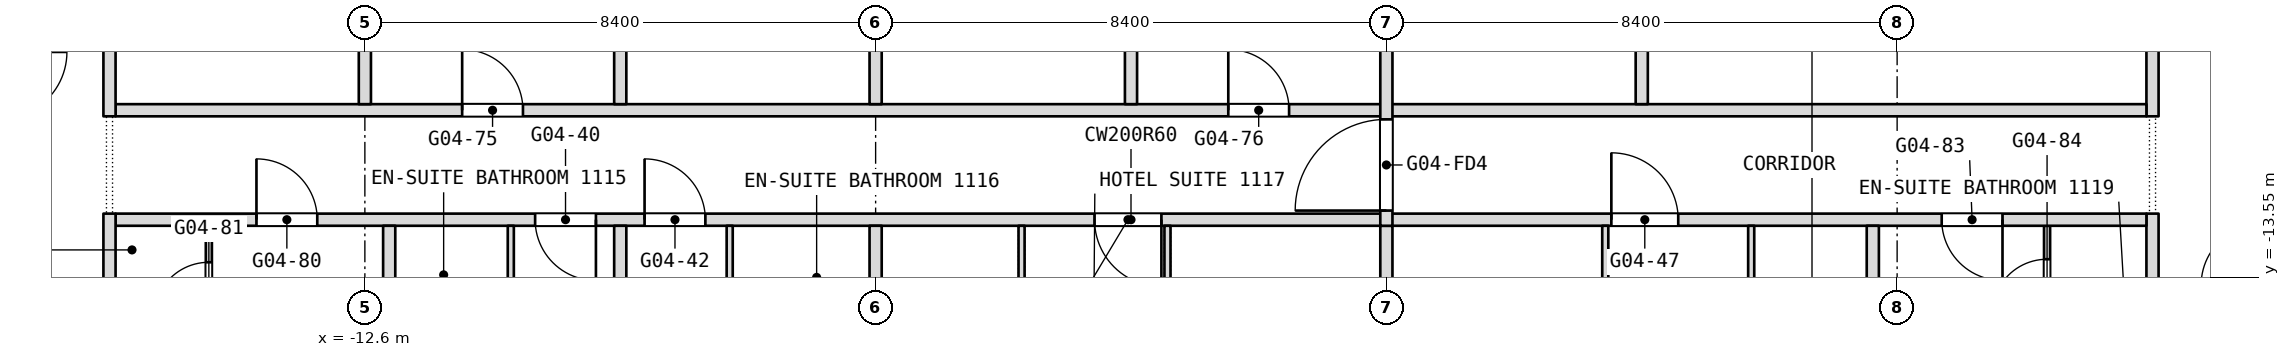
"""IFC4 building model, lengths in metres.
Left out: names, types, materials, properties, quantities, classifications, styles, units other than length and angle.
Written with IfcOpenShell. Run it as: python <this file> out.ifc"""

import sys

from ifc_helpers import new_model, si_unit, direction, frame, frame_2d, origin, place, context, subcontext, project, spatial, rectangle, extrude, element, fill, save


model = new_model("IFC4")
c1 = context("Model", 3, precision=1e-05, world=origin(), true_north=direction((0.0, 1.0)))
c2 = subcontext(c1, "Body", "Model", "MODEL_VIEW")
j1 = project(units=[si_unit("LENGTHUNIT", "METRE"), si_unit("PLANEANGLEUNIT", "RADIAN")], contexts=[c1])
p1 = place(None, origin())
s1 = spatial("IfcSite", under=j1, at=p1, CompositionType="ELEMENT")
p2 = place(p1, origin())
s2 = spatial("IfcBuilding", under=s1, at=p2, CompositionType="ELEMENT")
p3 = place(p2, frame((0.0, 0.0, 54.5)))
s3 = spatial("IfcBuildingStorey", under=s2, at=p3, CompositionType="ELEMENT", Elevation=54.5)
p4 = place(p3, frame((16.8, -17.143, 0.0), z_axis=(0.0, 0.0, 1.0), x_axis=(0.0, 1.0, 0.0)))
e1 = element("IfcWall", 1, at=p4, inside=s3, PredefinedType="PARTITIONING", context=c2, shape_type="SweptSolid", body=[
    extrude(rectangle(XDim=4.643, YDim=0.2, at=frame_2d((2.322, 0.0))), origin(), (0.0, 0.0, 1.0), 3.34),
])
p5 = place(p4, frame((0.771, 0.0, 0.0)))
e2 = element("IfcOpeningElement", 2, at=p5, cuts=e1, PredefinedType="OPENING", context=c2, shape_type="SweptSolid", body=[
    extrude(rectangle(XDim=0.9, YDim=2.1, at=frame_2d((0.45, 1.05))), frame((0.0, 0.1, 0.0), z_axis=(0.0, -1.0, 0.0), x_axis=(1.0, 0.0, 0.0)), (0.0, 0.0, 1.0), 0.2),
])
p6 = place(p3, frame((16.8, -10.9, 0.0), z_axis=(0.0, 0.0, 1.0), x_axis=(0.0, 1.0, 0.0)))
e3 = element("IfcWall", 3, at=p6, inside=s3, PredefinedType="PARTITIONING", context=c2, shape_type="SweptSolid", body=[
    extrude(rectangle(XDim=7.3, YDim=0.2, at=frame_2d((3.65, 0.0))), origin(), (0.0, 0.0, 1.0), 3.34),
])
p7 = place(p6, frame((3.15, 0.0, 0.0)))
e4 = element("IfcOpeningElement", 4, at=p7, cuts=e3, PredefinedType="OPENING", context=c2, shape_type="SweptSolid", body=[
    extrude(rectangle(XDim=1.0, YDim=2.1, at=frame_2d((0.5, 1.05))), frame((0.0, 0.1, 0.0), z_axis=(0.0, -1.0, 0.0), x_axis=(1.0, 0.0, 0.0)), (0.0, 0.0, 1.0), 0.2),
])
p8 = place(p3, frame((15.066, -14.9, 0.0), z_axis=(0.0, 0.0, 1.0), x_axis=(0.0, 1.0, 0.0)))
e5 = element("IfcWall", 5, at=p8, inside=s3, PredefinedType="PARTITIONING", context=c2, shape_type="SweptSolid", body=[
    extrude(rectangle(XDim=2.2, YDim=0.1, at=frame_2d((1.1, 0.0))), origin(), (0.0, 0.0, 1.0), 3.34),
])
p9 = place(p8, frame((0.75, 0.0, 0.0)))
e6 = element("IfcOpeningElement", 6, at=p9, cuts=e5, PredefinedType="OPENING", context=c2, shape_type="SweptSolid", body=[
    extrude(rectangle(XDim=0.9, YDim=2.1, at=frame_2d((0.45, 1.05))), frame((0.0, 0.05, 0.0), z_axis=(0.0, -1.0, 0.0), x_axis=(1.0, 0.0, 0.0)), (0.0, 0.0, 1.0), 0.1),
])
p10 = place(p3, frame((-16.7, -12.6, 0.0), z_axis=(0.0, 0.0, 1.0), x_axis=(1.0, 0.0, 0.0)))
e7 = element("IfcWall", 7, at=p10, inside=s3, PredefinedType="PARTITIONING", context=c2, shape_type="SweptSolid", body=[
    extrude(rectangle(XDim=33.4, YDim=0.2, at=frame_2d((16.7, 0.0))), origin(), (0.0, 0.0, 1.0), 3.34),
])
p11 = place(p10, frame((6.9, 0.0, 0.0)))
e8 = element("IfcOpeningElement", 8, at=p11, cuts=e7, PredefinedType="OPENING", context=c2, shape_type="SweptSolid", body=[
    extrude(rectangle(XDim=1.0, YDim=2.1, at=frame_2d((0.5, 1.05))), frame((0.0, 0.1, 0.0), z_axis=(0.0, -1.0, 0.0), x_axis=(1.0, 0.0, 0.0)), (0.0, 0.0, 1.0), 0.2),
])
p12 = place(p10, frame((8.7, 0.0, 0.0)))
e9 = element("IfcOpeningElement", 9, at=p12, cuts=e7, PredefinedType="OPENING", context=c2, shape_type="SweptSolid", body=[
    extrude(rectangle(XDim=1.0, YDim=2.1, at=frame_2d((0.5, 1.05))), frame((0.0, 0.1, 0.0), z_axis=(0.0, -1.0, 0.0), x_axis=(1.0, 0.0, 0.0)), (0.0, 0.0, 1.0), 0.2),
])
p13 = place(p10, frame((16.1, 0.0, 0.0)))
e10 = element("IfcOpeningElement", 10, at=p13, cuts=e7, PredefinedType="OPENING", context=c2, shape_type="SweptSolid", body=[
    extrude(rectangle(XDim=1.1, YDim=2.1, at=frame_2d((0.55, 1.05))), frame((0.0, 0.1, 0.0), z_axis=(0.0, -1.0, 0.0), x_axis=(1.0, 0.0, 0.0)), (0.0, 0.0, 1.0), 0.2),
])
p14 = place(p10, frame((24.6, 0.0, 0.0)))
e11 = element("IfcOpeningElement", 11, at=p14, cuts=e7, PredefinedType="OPENING", context=c2, shape_type="SweptSolid", body=[
    extrude(rectangle(XDim=1.1, YDim=2.1, at=frame_2d((0.55, 1.05))), frame((0.0, 0.1, 0.0), z_axis=(0.0, -1.0, 0.0), x_axis=(1.0, 0.0, 0.0)), (0.0, 0.0, 1.0), 0.2),
])
p15 = place(p10, frame((2.317, 0.0, 0.0)))
e12 = element("IfcOpeningElement", 12, at=p15, cuts=e7, PredefinedType="OPENING", context=c2, shape_type="SweptSolid", body=[
    extrude(rectangle(XDim=1.0, YDim=2.1, at=frame_2d((0.5, 1.05))), frame((0.0, 0.1, 0.0), z_axis=(0.0, -1.0, 0.0), x_axis=(1.0, 0.0, 0.0)), (0.0, 0.0, 1.0), 0.2),
])
p16 = place(p10, frame((30.033, 0.0, 0.0)))
e13 = element("IfcOpeningElement", 13, at=p16, cuts=e7, PredefinedType="OPENING", context=c2, shape_type="SweptSolid", body=[
    extrude(rectangle(XDim=1.0, YDim=2.1, at=frame_2d((0.5, 1.05))), frame((0.0, 0.1, 0.0), z_axis=(0.0, -1.0, 0.0), x_axis=(1.0, 0.0, 0.0)), (0.0, 0.0, 1.0), 0.2),
])
p17 = place(p3, frame((12.2, -15.8, 0.0), z_axis=(0.0, 0.0, 1.0), x_axis=(0.0, 1.0, 0.0)))
e14 = element("IfcWall", 14, at=p17, inside=s3, PredefinedType="PARTITIONING", context=c2, shape_type="SweptSolid", body=[
    extrude(rectangle(XDim=3.1, YDim=0.2, at=frame_2d((1.55, 0.0))), origin(), (0.0, 0.0, 1.0), 3.34),
])
p18 = place(p3, frame((-16.7, -10.8, 0.0), z_axis=(0.0, 0.0, 1.0), x_axis=(1.0, 0.0, 0.0)))
e15 = element("IfcWall", 15, at=p18, inside=s3, PredefinedType="PARTITIONING", context=c2, shape_type="SweptSolid", body=[
    extrude(rectangle(XDim=33.4, YDim=0.2, at=frame_2d((16.7, 0.0))), origin(), (0.0, 0.0, 1.0), 3.34),
])
p19 = place(p18, frame((5.7, 0.0, 0.0)))
e16 = element("IfcOpeningElement", 16, at=p19, cuts=e15, PredefinedType="OPENING", context=c2, shape_type="SweptSolid", body=[
    extrude(rectangle(XDim=1.0, YDim=2.1, at=frame_2d((0.5, 1.05))), frame((0.0, 0.1, 0.0), z_axis=(0.0, -1.0, 0.0), x_axis=(1.0, 0.0, 0.0)), (0.0, 0.0, 1.0), 0.2),
])
p20 = place(p18, frame((18.3, 0.0, 0.0)))
e17 = element("IfcOpeningElement", 17, at=p20, cuts=e15, PredefinedType="OPENING", context=c2, shape_type="SweptSolid", body=[
    extrude(rectangle(XDim=1.0, YDim=2.1, at=frame_2d((0.5, 1.05))), frame((0.0, 0.1, 0.0), z_axis=(0.0, -1.0, 0.0), x_axis=(1.0, 0.0, 0.0)), (0.0, 0.0, 1.0), 0.2),
])
p21 = place(p3, frame((10.2, -16.25, 0.0), z_axis=(0.0, 0.0, 1.0), x_axis=(0.0, 1.0, 0.0)))
e18 = element("IfcWall", 18, at=p21, inside=s3, PredefinedType="PARTITIONING", context=c2, shape_type="SweptSolid", body=[
    extrude(rectangle(XDim=3.55, YDim=0.1, at=frame_2d((1.775, 0.0))), origin(), (0.0, 0.0, 1.0), 3.34),
])
p22 = place(p3, frame((8.4, -10.7, 0.0), z_axis=(0.0, 0.0, 1.0), x_axis=(0.0, 1.0, 0.0)))
e19 = element("IfcWall", 19, at=p22, inside=s3, PredefinedType="PARTITIONING", context=c2, shape_type="SweptSolid", body=[
    extrude(rectangle(XDim=3.6, YDim=0.2, at=frame_2d((1.8, 0.0))), origin(), (0.0, 0.0, 1.0), 3.34),
])
p23 = place(p3, frame((7.8, -16.15, 0.0), z_axis=(0.0, 0.0, 1.0), x_axis=(0.0, 1.0, 0.0)))
e20 = element("IfcWall", 20, at=p23, inside=s3, PredefinedType="PARTITIONING", context=c2, shape_type="SweptSolid", body=[
    extrude(rectangle(XDim=3.45, YDim=0.1, at=frame_2d((1.725, 0.0))), origin(), (0.0, 0.0, 1.0), 3.34),
])
p24 = place(p3, frame((4.2, -17.7, 0.0), z_axis=(0.0, 0.0, 1.0), x_axis=(0.0, 1.0, 0.0)))
e21 = element("IfcWall", 21, at=p24, inside=s3, PredefinedType="PARTITIONING", context=c2, shape_type="SweptSolid", body=[
    extrude(rectangle(XDim=5.0, YDim=0.2, at=frame_2d((2.5, 0.0))), origin(), (0.0, 0.0, 1.0), 3.34),
])
p25 = place(p3, frame((4.2, -12.7, 0.0), z_axis=(0.0, 0.0, 1.0), x_axis=(0.0, 1.0, 0.0)))
e22 = element("IfcWall", 22, at=p25, inside=s3, PredefinedType="PARTITIONING", context=c2, shape_type="SweptSolid", body=[
    extrude(rectangle(XDim=12.7, YDim=0.2, at=frame_2d((6.35, 0.0))), origin(), (0.0, 0.0, 1.0), 3.34),
])
p26 = place(p25, frame((11.05, 0.0, 0.0)))
e23 = element("IfcOpeningElement", 23, at=p26, cuts=e22, PredefinedType="OPENING", context=c2, shape_type="SweptSolid", body=[
    extrude(rectangle(XDim=1.5, YDim=2.1, at=frame_2d((0.75, 1.05))), frame((0.0, 0.1, 0.0), z_axis=(0.0, -1.0, 0.0), x_axis=(1.0, 0.0, 0.0)), (0.0, 0.0, 1.0), 0.2),
])
p27 = place(p25, frame((0.25, 0.0, 0.0)))
e24 = element("IfcOpeningElement", 24, at=p27, cuts=e22, PredefinedType="OPENING", context=c2, shape_type="SweptSolid", body=[
    extrude(rectangle(XDim=1.5, YDim=2.1, at=frame_2d((0.75, 1.05))), frame((0.0, 0.1, 0.0), z_axis=(0.0, -1.0, 0.0), x_axis=(1.0, 0.0, 0.0)), (0.0, 0.0, 1.0), 0.2),
])
p28 = place(p3, frame((0.6, -16.25, 0.0), z_axis=(0.0, 0.0, 1.0), x_axis=(0.0, 1.0, 0.0)))
e25 = element("IfcWall", 25, at=p28, inside=s3, PredefinedType="PARTITIONING", context=c2, shape_type="SweptSolid", body=[
    extrude(rectangle(XDim=3.55, YDim=0.1, at=frame_2d((1.775, 0.0))), origin(), (0.0, 0.0, 1.0), 3.34),
])
p29 = place(p3, frame((0.0, -10.7, 0.0), z_axis=(0.0, 0.0, 1.0), x_axis=(0.0, 1.0, 0.0)))
e26 = element("IfcWall", 26, at=p29, inside=s3, PredefinedType="PARTITIONING", context=c2, shape_type="SweptSolid", body=[
    extrude(rectangle(XDim=8.8, YDim=0.2, at=frame_2d((4.4, 0.0))), origin(), (0.0, 0.0, 1.0), 3.34),
])
p30 = place(p3, frame((-1.8, -16.15, 0.0), z_axis=(0.0, 0.0, 1.0), x_axis=(0.0, 1.0, 0.0)))
e27 = element("IfcWall", 27, at=p30, inside=s3, PredefinedType="PARTITIONING", context=c2, shape_type="SweptSolid", body=[
    extrude(rectangle(XDim=3.45, YDim=0.1, at=frame_2d((1.725, 0.0))), origin(), (0.0, 0.0, 1.0), 3.34),
])
p31 = place(p3, frame((-4.2, -17.7, 0.0), z_axis=(0.0, 0.0, 1.0), x_axis=(0.0, 1.0, 0.0)))
e28 = element("IfcWall", 28, at=p31, inside=s3, PredefinedType="PARTITIONING", context=c2, shape_type="SweptSolid", body=[
    extrude(rectangle(XDim=5.0, YDim=0.2, at=frame_2d((2.5, 0.0))), origin(), (0.0, 0.0, 1.0), 3.34),
])
p32 = place(p3, frame((-4.2, -10.7, 0.0), z_axis=(0.0, 0.0, 1.0), x_axis=(0.0, 1.0, 0.0)))
e29 = element("IfcWall", 29, at=p32, inside=s3, PredefinedType="PARTITIONING", context=c2, shape_type="SweptSolid", body=[
    extrude(rectangle(XDim=8.8, YDim=0.2, at=frame_2d((4.4, 0.0))), origin(), (0.0, 0.0, 1.0), 3.34),
])
p33 = place(p3, frame((-6.6, -15.425, 0.0), z_axis=(0.0, 0.0, 1.0), x_axis=(0.0, 1.0, 0.0)))
e30 = element("IfcWall", 30, at=p33, inside=s3, PredefinedType="PARTITIONING", context=c2, shape_type="SweptSolid", body=[
    extrude(rectangle(XDim=2.725, YDim=0.1, at=frame_2d((1.363, 0.0))), origin(), (0.0, 0.0, 1.0), 3.34),
])
p34 = place(p3, frame((-8.4, -17.7, 0.0), z_axis=(0.0, 0.0, 1.0), x_axis=(0.0, 1.0, 0.0)))
e31 = element("IfcWall", 31, at=p34, inside=s3, PredefinedType="PARTITIONING", context=c2, shape_type="SweptSolid", body=[
    extrude(rectangle(XDim=5.0, YDim=0.2, at=frame_2d((2.5, 0.0))), origin(), (0.0, 0.0, 1.0), 3.34),
])
p35 = place(p3, frame((-8.4, -10.7, 0.0), z_axis=(0.0, 0.0, 1.0), x_axis=(0.0, 1.0, 0.0)))
e32 = element("IfcWall", 32, at=p35, inside=s3, PredefinedType="PARTITIONING", context=c2, shape_type="SweptSolid", body=[
    extrude(rectangle(XDim=5.4, YDim=0.2, at=frame_2d((2.7, 0.0))), origin(), (0.0, 0.0, 1.0), 3.34),
])
p36 = place(p3, frame((-10.2, -15.325, 0.0), z_axis=(0.0, 0.0, 1.0), x_axis=(0.0, 1.0, 0.0)))
e33 = element("IfcWall", 33, at=p36, inside=s3, PredefinedType="PARTITIONING", context=c2, shape_type="SweptSolid", body=[
    extrude(rectangle(XDim=2.625, YDim=0.1, at=frame_2d((1.312, 0.0))), origin(), (0.0, 0.0, 1.0), 3.34),
])
p37 = place(p3, frame((-12.2, -15.275, 0.0), z_axis=(0.0, 0.0, 1.0), x_axis=(0.0, 1.0, 0.0)))
e34 = element("IfcWall", 34, at=p37, inside=s3, PredefinedType="PARTITIONING", context=c2, shape_type="SweptSolid", body=[
    extrude(rectangle(XDim=2.575, YDim=0.2, at=frame_2d((1.288, 0.0))), origin(), (0.0, 0.0, 1.0), 3.34),
])
p38 = place(p3, frame((-12.6, -10.7, 0.0), z_axis=(0.0, 0.0, 1.0), x_axis=(0.0, 1.0, 0.0)))
e35 = element("IfcWall", 35, at=p38, inside=s3, PredefinedType="PARTITIONING", context=c2, shape_type="SweptSolid", body=[
    extrude(rectangle(XDim=5.4, YDim=0.2, at=frame_2d((2.7, 0.0))), origin(), (0.0, 0.0, 1.0), 3.34),
])
p39 = place(p3, frame((-15.166, -15.0, 0.0), z_axis=(0.0, 0.0, 1.0), x_axis=(0.0, 1.0, 0.0)))
e36 = element("IfcWall", 36, at=p39, inside=s3, PredefinedType="PARTITIONING", context=c2, shape_type="SweptSolid", body=[
    extrude(rectangle(XDim=2.3, YDim=0.1, at=frame_2d((1.15, 0.0))), origin(), (0.0, 0.0, 1.0), 3.34),
])
p40 = place(p39, frame((0.8, 0.0, 0.0)))
e37 = element("IfcOpeningElement", 37, at=p40, cuts=e36, PredefinedType="OPENING", context=c2, shape_type="SweptSolid", body=[
    extrude(rectangle(XDim=0.9, YDim=2.1, at=frame_2d((0.45, 1.05))), frame((0.0, 0.05, 0.0), z_axis=(0.0, -1.0, 0.0), x_axis=(1.0, 0.0, 0.0)), (0.0, 0.0, 1.0), 0.1),
])
p41 = place(p3, frame((-16.8, -17.143, 0.0), z_axis=(0.0, 0.0, 1.0), x_axis=(0.0, 1.0, 0.0)))
e38 = element("IfcWall", 38, at=p41, inside=s3, PredefinedType="PARTITIONING", context=c2, shape_type="SweptSolid", body=[
    extrude(rectangle(XDim=4.643, YDim=0.2, at=frame_2d((2.322, 0.0))), origin(), (0.0, 0.0, 1.0), 3.34),
])
p42 = place(p41, frame((0.772, 0.0, 0.0)))
e39 = element("IfcOpeningElement", 39, at=p42, cuts=e38, PredefinedType="OPENING", context=c2, shape_type="SweptSolid", body=[
    extrude(rectangle(XDim=0.9, YDim=2.1, at=frame_2d((0.45, 1.05))), frame((0.0, 0.1, 0.0), z_axis=(0.0, -1.0, 0.0), x_axis=(1.0, 0.0, 0.0)), (0.0, 0.0, 1.0), 0.2),
])
p43 = place(p3, frame((-16.8, -10.9, 0.0), z_axis=(0.0, 0.0, 1.0), x_axis=(0.0, 1.0, 0.0)))
e40 = element("IfcWall", 40, at=p43, inside=s3, PredefinedType="PARTITIONING", context=c2, shape_type="SweptSolid", body=[
    extrude(rectangle(XDim=9.0, YDim=0.2, at=frame_2d((4.5, 0.0))), origin(), (0.0, 0.0, 1.0), 3.34),
])
p44 = place(p9, origin())
e41 = element("IfcDoor", 41, at=p44, inside=s3, OperationType="SINGLE_SWING_RIGHT", PredefinedType="DOOR", context=c2, shape_type="SweptSolid", body=[
    extrude(rectangle(XDim=0.9, YDim=2.1, at=frame_2d((0.45, 1.05))), frame((0.0, 0.025, 0.0), z_axis=(0.0, -1.0, 0.0), x_axis=(1.0, 0.0, 0.0)), (0.0, 0.0, 1.0), 0.05),
])
fill(e6, e41)
p45 = place(p11, origin())
e42 = element("IfcDoor", 42, at=p45, inside=s3, OperationType="SINGLE_SWING_RIGHT", PredefinedType="DOOR", context=c2, shape_type="SweptSolid", body=[
    extrude(rectangle(XDim=1.0, YDim=2.1, at=frame_2d((0.5, 1.05))), frame((0.0, 0.025, 0.0), z_axis=(0.0, -1.0, 0.0), x_axis=(1.0, 0.0, 0.0)), (0.0, 0.0, 1.0), 0.05),
])
fill(e8, e42)
p46 = place(p12, origin())
e43 = element("IfcDoor", 43, at=p46, inside=s3, OperationType="SINGLE_SWING_RIGHT", PredefinedType="DOOR", context=c2, shape_type="SweptSolid", body=[
    extrude(rectangle(XDim=1.0, YDim=2.1, at=frame_2d((0.5, 1.05))), frame((0.0, 0.025, 0.0), z_axis=(0.0, -1.0, 0.0), x_axis=(1.0, 0.0, 0.0)), (0.0, 0.0, 1.0), 0.05),
])
fill(e9, e43)
p47 = place(p13, origin())
e44 = element("IfcDoor", 44, at=p47, inside=s3, OperationType="SINGLE_SWING_LEFT", PredefinedType="DOOR", context=c2, shape_type="SweptSolid", body=[
    extrude(rectangle(XDim=1.1, YDim=2.1, at=frame_2d((0.55, 1.05))), frame((0.0, 0.025, 0.0), z_axis=(0.0, -1.0, 0.0), x_axis=(1.0, 0.0, 0.0)), (0.0, 0.0, 1.0), 0.05),
])
fill(e10, e44)
p48 = place(p14, origin())
e45 = element("IfcDoor", 45, at=p48, inside=s3, OperationType="SINGLE_SWING_RIGHT", PredefinedType="DOOR", context=c2, shape_type="SweptSolid", body=[
    extrude(rectangle(XDim=1.1, YDim=2.1, at=frame_2d((0.55, 1.05))), frame((0.0, 0.025, 0.0), z_axis=(0.0, -1.0, 0.0), x_axis=(1.0, 0.0, 0.0)), (0.0, 0.0, 1.0), 0.05),
])
fill(e11, e45)
p49 = place(p15, origin())
e46 = element("IfcDoor", 46, at=p49, inside=s3, OperationType="SINGLE_SWING_RIGHT", PredefinedType="DOOR", context=c2, shape_type="SweptSolid", body=[
    extrude(rectangle(XDim=1.0, YDim=2.1, at=frame_2d((0.5, 1.05))), frame((0.0, 0.025, 0.0), z_axis=(0.0, -1.0, 0.0), x_axis=(1.0, 0.0, 0.0)), (0.0, 0.0, 1.0), 0.05),
])
fill(e12, e46)
p50 = place(p16, origin())
e47 = element("IfcDoor", 47, at=p50, inside=s3, OperationType="SINGLE_SWING_LEFT", PredefinedType="DOOR", context=c2, shape_type="SweptSolid", body=[
    extrude(rectangle(XDim=1.0, YDim=2.1, at=frame_2d((0.5, 1.05))), frame((0.0, 0.025, 0.0), z_axis=(0.0, -1.0, 0.0), x_axis=(1.0, 0.0, 0.0)), (0.0, 0.0, 1.0), 0.05),
])
fill(e13, e47)
p51 = place(p19, origin())
e48 = element("IfcDoor", 48, at=p51, inside=s3, OperationType="SINGLE_SWING_LEFT", PredefinedType="DOOR", context=c2, shape_type="SweptSolid", body=[
    extrude(rectangle(XDim=1.0, YDim=2.1, at=frame_2d((0.5, 1.05))), frame((0.0, 0.025, 0.0), z_axis=(0.0, -1.0, 0.0), x_axis=(1.0, 0.0, 0.0)), (0.0, 0.0, 1.0), 0.05),
])
fill(e16, e48)
p52 = place(p20, origin())
e49 = element("IfcDoor", 49, at=p52, inside=s3, OperationType="SINGLE_SWING_RIGHT", PredefinedType="DOOR", context=c2, shape_type="SweptSolid", body=[
    extrude(rectangle(XDim=1.0, YDim=2.1, at=frame_2d((0.5, 1.05))), frame((0.0, 0.025, 0.0), z_axis=(0.0, -1.0, 0.0), x_axis=(1.0, 0.0, 0.0)), (0.0, 0.0, 1.0), 0.05),
])
fill(e17, e49)
p53 = place(p40, origin())
e50 = element("IfcDoor", 50, at=p53, inside=s3, OperationType="SINGLE_SWING_RIGHT", PredefinedType="DOOR", context=c2, shape_type="SweptSolid", body=[
    extrude(rectangle(XDim=0.9, YDim=2.1, at=frame_2d((0.45, 1.05))), frame((0.0, 0.025, 0.0), z_axis=(0.0, -1.0, 0.0), x_axis=(1.0, 0.0, 0.0)), (0.0, 0.0, 1.0), 0.05),
])
fill(e37, e50)
p54 = place(p27, origin())
e51 = element("IfcDoor", 51, at=p54, inside=s3, OperationType="DOUBLE_DOOR_DOUBLE_SWING", PredefinedType="DOOR", context=c2, shape_type="SweptSolid", body=[
    extrude(rectangle(XDim=1.5, YDim=2.1, at=frame_2d((0.75, 1.05))), frame((0.0, 0.025, 0.0), z_axis=(0.0, -1.0, 0.0), x_axis=(1.0, 0.0, 0.0)), (0.0, 0.0, 1.0), 0.05),
])
fill(e24, e51)
save(model, sys.argv[1])
